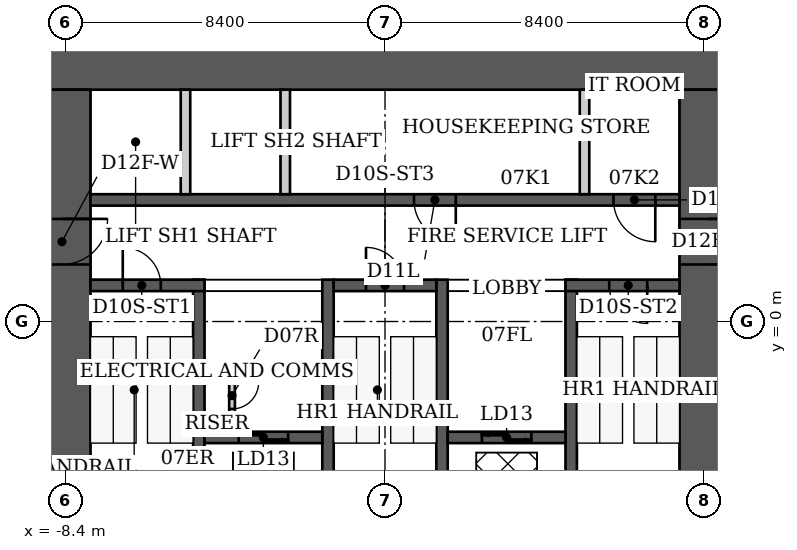
"""IFC4 building model, lengths in metres.
Left out: names, types, materials, properties, quantities, classifications, styles, units other than length and angle.
Written with IfcOpenShell. Run it as: python <this file> out.ifc"""

import sys

from ifc_helpers import new_model, si_unit, direction, frame, frame_2d, origin, place, context, subcontext, project, spatial, rectangle, extrude, element, fill, save


model = new_model("IFC4")
c1 = context("Model", 3, precision=1e-05, world=origin(), true_north=direction((0.0, 1.0)))
c2 = subcontext(c1, "Body", "Model", "MODEL_VIEW")
j1 = project(units=[si_unit("LENGTHUNIT", "METRE"), si_unit("PLANEANGLEUNIT", "RADIAN")], contexts=[c1])
p1 = place(None, origin())
s1 = spatial("IfcSite", under=j1, at=p1, CompositionType="ELEMENT")
p2 = place(p1, origin())
s2 = spatial("IfcBuilding", under=s1, at=p2, CompositionType="ELEMENT")
p3 = place(p2, frame((0.0, 0.0, 34.4)))
s3 = spatial("IfcBuildingStorey", under=s2, at=p3, CompositionType="ELEMENT", Elevation=34.4)
p4 = place(p3, frame((-9.25, 6.85, 0.0), z_axis=(0.0, 0.0, 1.0), x_axis=(1.0, 0.0, 0.0)))
e1 = element("IfcWall", 1, at=p4, inside=s3, PredefinedType="SHEAR", context=c2, shape_type="SweptSolid", body=[
    extrude(rectangle(XDim=18.5, YDim=1.5, at=frame_2d((9.25, 0.0))), origin(), (0.0, 0.0, 1.0), 3.8),
])
p5 = place(p3, frame((-8.5, -9.2, 0.0), z_axis=(0.0, 0.0, 1.0), x_axis=(0.0, 1.0, 0.0)))
e2 = element("IfcWall", 2, at=p5, inside=s3, PredefinedType="SHEAR", context=c2, shape_type="SweptSolid", body=[
    extrude(rectangle(XDim=15.3, YDim=1.5, at=frame_2d((7.65, 0.0))), origin(), (0.0, 0.0, 1.0), 3.8),
])
p6 = place(p5, frame((10.7, 0.0, 0.0)))
e3 = element("IfcOpeningElement", 3, at=p6, cuts=e2, PredefinedType="OPENING", context=c2, shape_type="SweptSolid", body=[
    extrude(rectangle(XDim=1.2, YDim=2.2, at=frame_2d((0.6, 1.1))), frame((0.0, 0.75, 0.0), z_axis=(0.0, -1.0, 0.0), x_axis=(1.0, 0.0, 0.0)), (0.0, 0.0, 1.0), 1.5),
])
p7 = place(p3, frame((8.5, -9.2, 0.0), z_axis=(0.0, 0.0, 1.0), x_axis=(0.0, 1.0, 0.0)))
e4 = element("IfcWall", 4, at=p7, inside=s3, PredefinedType="SHEAR", context=c2, shape_type="SweptSolid", body=[
    extrude(rectangle(XDim=15.3, YDim=1.5, at=frame_2d((7.65, 0.0))), origin(), (0.0, 0.0, 1.0), 3.8),
])
p8 = place(p7, frame((10.7, 0.0, 0.0)))
e5 = element("IfcOpeningElement", 5, at=p8, cuts=e4, PredefinedType="OPENING", context=c2, shape_type="SweptSolid", body=[
    extrude(rectangle(XDim=1.2, YDim=2.2, at=frame_2d((0.6, 1.1))), frame((0.0, 0.75, 0.0), z_axis=(0.0, -1.0, 0.0), x_axis=(1.0, 0.0, 0.0)), (0.0, 0.0, 1.0), 1.5),
])
for number, where, z_axis, x_axis in (
    (6, (-4.9, -6.1, 0.0), (0.0, 0.0, 1.0), (0.0, 1.0, 0.0)),
    (7, (-1.5, -6.1, 0.0), (0.0, 0.0, 1.0), (0.0, 1.0, 0.0)),
    (8, (1.5, -6.1, 0.0), (0.0, 0.0, 1.0), (0.0, 1.0, 0.0)),
    (9, (4.9, -6.1, 0.0), (0.0, 0.0, 1.0), (0.0, 1.0, 0.0)),
):
    element("IfcWall", number, at=place(p3, frame(where, z_axis=z_axis, x_axis=x_axis)), inside=s3, PredefinedType="SHEAR", context=c2, shape_type="SweptSolid", body=[
        extrude(rectangle(XDim=7.2, YDim=0.3, at=frame_2d((3.6, 0.0))), origin(), (0.0, 0.0, 1.0), 3.8),
    ])
p9 = place(p3, frame((-7.75, 0.95, 0.0), z_axis=(0.0, 0.0, 1.0), x_axis=(1.0, 0.0, 0.0)))
e10 = element("IfcWall", 10, at=p9, inside=s3, PredefinedType="SHEAR", context=c2, shape_type="SweptSolid", body=[
    extrude(rectangle(XDim=3.0, YDim=0.3, at=frame_2d((1.5, 0.0))), origin(), (0.0, 0.0, 1.0), 3.8),
])
p10 = place(p9, frame((0.85, 0.0, 0.0)))
e11 = element("IfcOpeningElement", 11, at=p10, cuts=e10, PredefinedType="OPENING", context=c2, shape_type="SweptSolid", body=[
    extrude(rectangle(XDim=1.0, YDim=2.2, at=frame_2d((0.5, 1.1))), frame((0.0, 0.15, 0.0), z_axis=(0.0, -1.0, 0.0), x_axis=(1.0, 0.0, 0.0)), (0.0, 0.0, 1.0), 0.3),
])
p11 = place(p3, frame((-1.35, 0.95, 0.0), z_axis=(0.0, 0.0, 1.0), x_axis=(1.0, 0.0, 0.0)))
e12 = element("IfcWall", 12, at=p11, inside=s3, PredefinedType="SHEAR", context=c2, shape_type="SweptSolid", body=[
    extrude(rectangle(XDim=2.7, YDim=0.3, at=frame_2d((1.35, 0.0))), origin(), (0.0, 0.0, 1.0), 3.8),
])
p12 = place(p11, frame((0.85, 0.0, 0.0)))
e13 = element("IfcOpeningElement", 13, at=p12, cuts=e12, PredefinedType="OPENING", context=c2, shape_type="SweptSolid", body=[
    extrude(rectangle(XDim=1.0, YDim=2.2, at=frame_2d((0.5, 1.1))), frame((0.0, 0.15, 0.0), z_axis=(0.0, -1.0, 0.0), x_axis=(1.0, 0.0, 0.0)), (0.0, 0.0, 1.0), 0.3),
])
p13 = place(p3, frame((4.75, 0.95, 0.0), z_axis=(0.0, 0.0, 1.0), x_axis=(1.0, 0.0, 0.0)))
e14 = element("IfcWall", 14, at=p13, inside=s3, PredefinedType="SHEAR", context=c2, shape_type="SweptSolid", body=[
    extrude(rectangle(XDim=3.0, YDim=0.3, at=frame_2d((1.5, 0.0))), origin(), (0.0, 0.0, 1.0), 3.8),
])
p14 = place(p13, frame((1.15, 0.0, 0.0)))
e15 = element("IfcOpeningElement", 15, at=p14, cuts=e14, PredefinedType="OPENING", context=c2, shape_type="SweptSolid", body=[
    extrude(rectangle(XDim=1.0, YDim=2.2, at=frame_2d((0.5, 1.1))), frame((0.0, 0.15, 0.0), z_axis=(0.0, -1.0, 0.0), x_axis=(1.0, 0.0, 0.0)), (0.0, 0.0, 1.0), 0.3),
])
p15 = place(p3, frame((-4.75, -3.05, 0.0), z_axis=(0.0, 0.0, 1.0), x_axis=(1.0, 0.0, 0.0)))
e16 = element("IfcWall", 16, at=p15, inside=s3, PredefinedType="SHEAR", context=c2, shape_type="SweptSolid", body=[
    extrude(rectangle(XDim=3.1, YDim=0.3, at=frame_2d((1.55, 0.0))), origin(), (0.0, 0.0, 1.0), 3.8),
])
p16 = place(p15, frame((0.9, 0.0, 0.0)))
e17 = element("IfcOpeningElement", 17, at=p16, cuts=e16, PredefinedType="OPENING", context=c2, shape_type="SweptSolid", body=[
    extrude(rectangle(XDim=1.3, YDim=2.1, at=frame_2d((0.65, 1.05))), frame((0.0, 0.15, 0.0), z_axis=(0.0, -1.0, 0.0), x_axis=(1.0, 0.0, 0.0)), (0.0, 0.0, 1.0), 0.3),
])
p17 = place(p3, frame((1.65, -3.05, 0.0), z_axis=(0.0, 0.0, 1.0), x_axis=(1.0, 0.0, 0.0)))
e18 = element("IfcWall", 18, at=p17, inside=s3, PredefinedType="SHEAR", context=c2, shape_type="SweptSolid", body=[
    extrude(rectangle(XDim=3.1, YDim=0.3, at=frame_2d((1.55, 0.0))), origin(), (0.0, 0.0, 1.0), 3.8),
])
p18 = place(p17, frame((0.9, 0.0, 0.0)))
e19 = element("IfcOpeningElement", 19, at=p18, cuts=e18, PredefinedType="OPENING", context=c2, shape_type="SweptSolid", body=[
    extrude(rectangle(XDim=1.3, YDim=2.1, at=frame_2d((0.65, 1.05))), frame((0.0, 0.15, 0.0), z_axis=(0.0, -1.0, 0.0), x_axis=(1.0, 0.0, 0.0)), (0.0, 0.0, 1.0), 0.3),
])
p19 = place(p3, frame((-7.75, 3.2, 0.0), z_axis=(0.0, 0.0, 1.0), x_axis=(1.0, 0.0, 0.0)))
e20 = element("IfcWall", 20, at=p19, inside=s3, PredefinedType="SHEAR", context=c2, shape_type="SweptSolid", body=[
    extrude(rectangle(XDim=15.5, YDim=0.3, at=frame_2d((7.75, 0.0))), origin(), (0.0, 0.0, 1.0), 3.8),
])
p20 = place(p19, frame((8.512, 0.0, 0.0)))
e21 = element("IfcOpeningElement", 21, at=p20, cuts=e20, PredefinedType="OPENING", context=c2, shape_type="SweptSolid", body=[
    extrude(rectangle(XDim=1.1, YDim=2.2, at=frame_2d((0.55, 1.1))), frame((0.0, 0.15, 0.0), z_axis=(0.0, -1.0, 0.0), x_axis=(1.0, 0.0, 0.0)), (0.0, 0.0, 1.0), 0.3),
])
p21 = place(p19, frame((13.762, 0.0, 0.0)))
e22 = element("IfcOpeningElement", 22, at=p21, cuts=e20, PredefinedType="OPENING", context=c2, shape_type="SweptSolid", body=[
    extrude(rectangle(XDim=1.1, YDim=2.2, at=frame_2d((0.55, 1.1))), frame((0.0, 0.15, 0.0), z_axis=(0.0, -1.0, 0.0), x_axis=(1.0, 0.0, 0.0)), (0.0, 0.0, 1.0), 0.3),
])
for number, where, z_axis, x_axis in (
    (23, (-5.25, 3.35, 0.0), (0.0, 0.0, 1.0), (0.0, 1.0, 0.0)),
    (24, (-2.625, 3.35, 0.0), (0.0, 0.0, 1.0), (0.0, 1.0, 0.0)),
    (25, (5.25, 3.35, 0.0), (0.0, 0.0, 1.0), (0.0, 1.0, 0.0)),
):
    element("IfcWall", number, at=place(p3, frame(where, z_axis=z_axis, x_axis=x_axis)), inside=s3, PredefinedType="PARTITIONING", context=c2, shape_type="SweptSolid", body=[
        extrude(rectangle(XDim=2.75, YDim=0.25, at=frame_2d((1.375, 0.0))), origin(), (0.0, 0.0, 1.0), 3.8),
    ])
p22 = place(p3, frame((-4.025, -2.9, 0.0), z_axis=(0.0, 0.0, 1.0), x_axis=(0.0, 1.0, 0.0)))
e26 = element("IfcWall", 26, at=p22, inside=s3, PredefinedType="PARTITIONING", context=c2, shape_type="SweptSolid", body=[
    extrude(rectangle(XDim=1.775, YDim=0.15, at=frame_2d((0.887, 0.0))), origin(), (0.0, 0.0, 1.0), 3.64),
])
p23 = place(p22, frame((0.6, 0.0, 0.0)))
e27 = element("IfcOpeningElement", 27, at=p23, cuts=e26, PredefinedType="OPENING", context=c2, shape_type="SweptSolid", body=[
    extrude(rectangle(XDim=0.7, YDim=2.1, at=frame_2d((0.35, 1.05))), frame((0.0, 0.075, 0.0), z_axis=(0.0, -1.0, 0.0), x_axis=(1.0, 0.0, 0.0)), (0.0, 0.0, 1.0), 0.15),
])
p24 = place(p3, frame((-4.75, -1.2, 0.0), z_axis=(0.0, 0.0, 1.0), x_axis=(1.0, 0.0, 0.0)))
e28 = element("IfcWall", 28, at=p24, inside=s3, PredefinedType="PARTITIONING", context=c2, shape_type="SweptSolid", body=[
    extrude(rectangle(XDim=0.8, YDim=0.15, at=frame_2d((0.4, 0.0))), origin(), (0.0, 0.0, 1.0), 3.64),
])
p25 = place(p10, origin())
e29 = element("IfcDoor", 29, at=p25, inside=s3, OperationType="SINGLE_SWING_LEFT", PredefinedType="DOOR", context=c2, shape_type="SweptSolid", body=[
    extrude(rectangle(XDim=1.0, YDim=2.2, at=frame_2d((0.5, 1.1))), frame((0.0, 0.025, 0.0), z_axis=(0.0, -1.0, 0.0), x_axis=(1.0, 0.0, 0.0)), (0.0, 0.0, 1.0), 0.05),
])
fill(e11, e29)
p26 = place(p12, origin())
e30 = element("IfcDoor", 30, at=p26, inside=s3, OperationType="SINGLE_SWING_LEFT", PredefinedType="DOOR", context=c2, shape_type="SweptSolid", body=[
    extrude(rectangle(XDim=1.0, YDim=2.2, at=frame_2d((0.5, 1.1))), frame((0.0, 0.025, 0.0), z_axis=(0.0, -1.0, 0.0), x_axis=(1.0, 0.0, 0.0)), (0.0, 0.0, 1.0), 0.05),
])
fill(e13, e30)
p27 = place(p14, origin())
e31 = element("IfcDoor", 31, at=p27, inside=s3, OperationType="SINGLE_SWING_RIGHT", PredefinedType="DOOR", context=c2, shape_type="SweptSolid", body=[
    extrude(rectangle(XDim=1.0, YDim=2.2, at=frame_2d((0.5, 1.1))), frame((0.0, 0.025, 0.0), z_axis=(0.0, -1.0, 0.0), x_axis=(1.0, 0.0, 0.0)), (0.0, 0.0, 1.0), 0.05),
])
fill(e15, e31)
p28 = place(p6, origin())
e32 = element("IfcDoor", 32, at=p28, inside=s3, OperationType="SINGLE_SWING_RIGHT", PredefinedType="DOOR", context=c2, shape_type="SweptSolid", body=[
    extrude(rectangle(XDim=1.2, YDim=2.2, at=frame_2d((0.6, 1.1))), frame((0.0, 0.025, 0.0), z_axis=(0.0, -1.0, 0.0), x_axis=(1.0, 0.0, 0.0)), (0.0, 0.0, 1.0), 0.05),
])
fill(e3, e32)
p29 = place(p8, origin())
e33 = element("IfcDoor", 33, at=p29, inside=s3, OperationType="SINGLE_SWING_RIGHT", PredefinedType="DOOR", context=c2, shape_type="SweptSolid", body=[
    extrude(rectangle(XDim=1.2, YDim=2.2, at=frame_2d((0.6, 1.1))), frame((0.0, 0.025, 0.0), z_axis=(0.0, -1.0, 0.0), x_axis=(1.0, 0.0, 0.0)), (0.0, 0.0, 1.0), 0.05),
])
fill(e5, e33)
p30 = place(p23, origin())
e34 = element("IfcDoor", 34, at=p30, inside=s3, OperationType="SINGLE_SWING_RIGHT", PredefinedType="DOOR", context=c2, shape_type="SweptSolid", body=[
    extrude(rectangle(XDim=0.7, YDim=2.1, at=frame_2d((0.35, 1.05))), frame((0.0, 0.025, 0.0), z_axis=(0.0, -1.0, 0.0), x_axis=(1.0, 0.0, 0.0)), (0.0, 0.0, 1.0), 0.05),
])
fill(e27, e34)
p31 = place(p20, origin())
e35 = element("IfcDoor", 35, at=p31, inside=s3, OperationType="SINGLE_SWING_RIGHT", PredefinedType="DOOR", context=c2, shape_type="SweptSolid", body=[
    extrude(rectangle(XDim=1.1, YDim=2.2, at=frame_2d((0.55, 1.1))), frame((0.0, 0.025, 0.0), z_axis=(0.0, -1.0, 0.0), x_axis=(1.0, 0.0, 0.0)), (0.0, 0.0, 1.0), 0.05),
])
fill(e21, e35)
p32 = place(p21, origin())
e36 = element("IfcDoor", 36, at=p32, inside=s3, OperationType="SINGLE_SWING_RIGHT", PredefinedType="DOOR", context=c2, shape_type="SweptSolid", body=[
    extrude(rectangle(XDim=1.1, YDim=2.2, at=frame_2d((0.55, 1.1))), frame((0.0, 0.025, 0.0), z_axis=(0.0, -1.0, 0.0), x_axis=(1.0, 0.0, 0.0)), (0.0, 0.0, 1.0), 0.05),
])
fill(e22, e36)
p33 = place(p16, origin())
e37 = element("IfcDoor", 37, at=p33, inside=s3, OperationType="DOUBLE_DOOR_SLIDING", PredefinedType="DOOR", context=c2, shape_type="SweptSolid", body=[
    extrude(rectangle(XDim=1.3, YDim=2.1, at=frame_2d((0.65, 1.05))), frame((0.0, 0.025, 0.0), z_axis=(0.0, -1.0, 0.0), x_axis=(1.0, 0.0, 0.0)), (0.0, 0.0, 1.0), 0.05),
])
fill(e17, e37)
p34 = place(p18, origin())
e38 = element("IfcDoor", 38, at=p34, inside=s3, OperationType="DOUBLE_DOOR_SLIDING", PredefinedType="DOOR", context=c2, shape_type="SweptSolid", body=[
    extrude(rectangle(XDim=1.3, YDim=2.1, at=frame_2d((0.65, 1.05))), frame((0.0, 0.025, 0.0), z_axis=(0.0, -1.0, 0.0), x_axis=(1.0, 0.0, 0.0)), (0.0, 0.0, 1.0), 0.05),
])
fill(e19, e38)
save(model, sys.argv[1])
